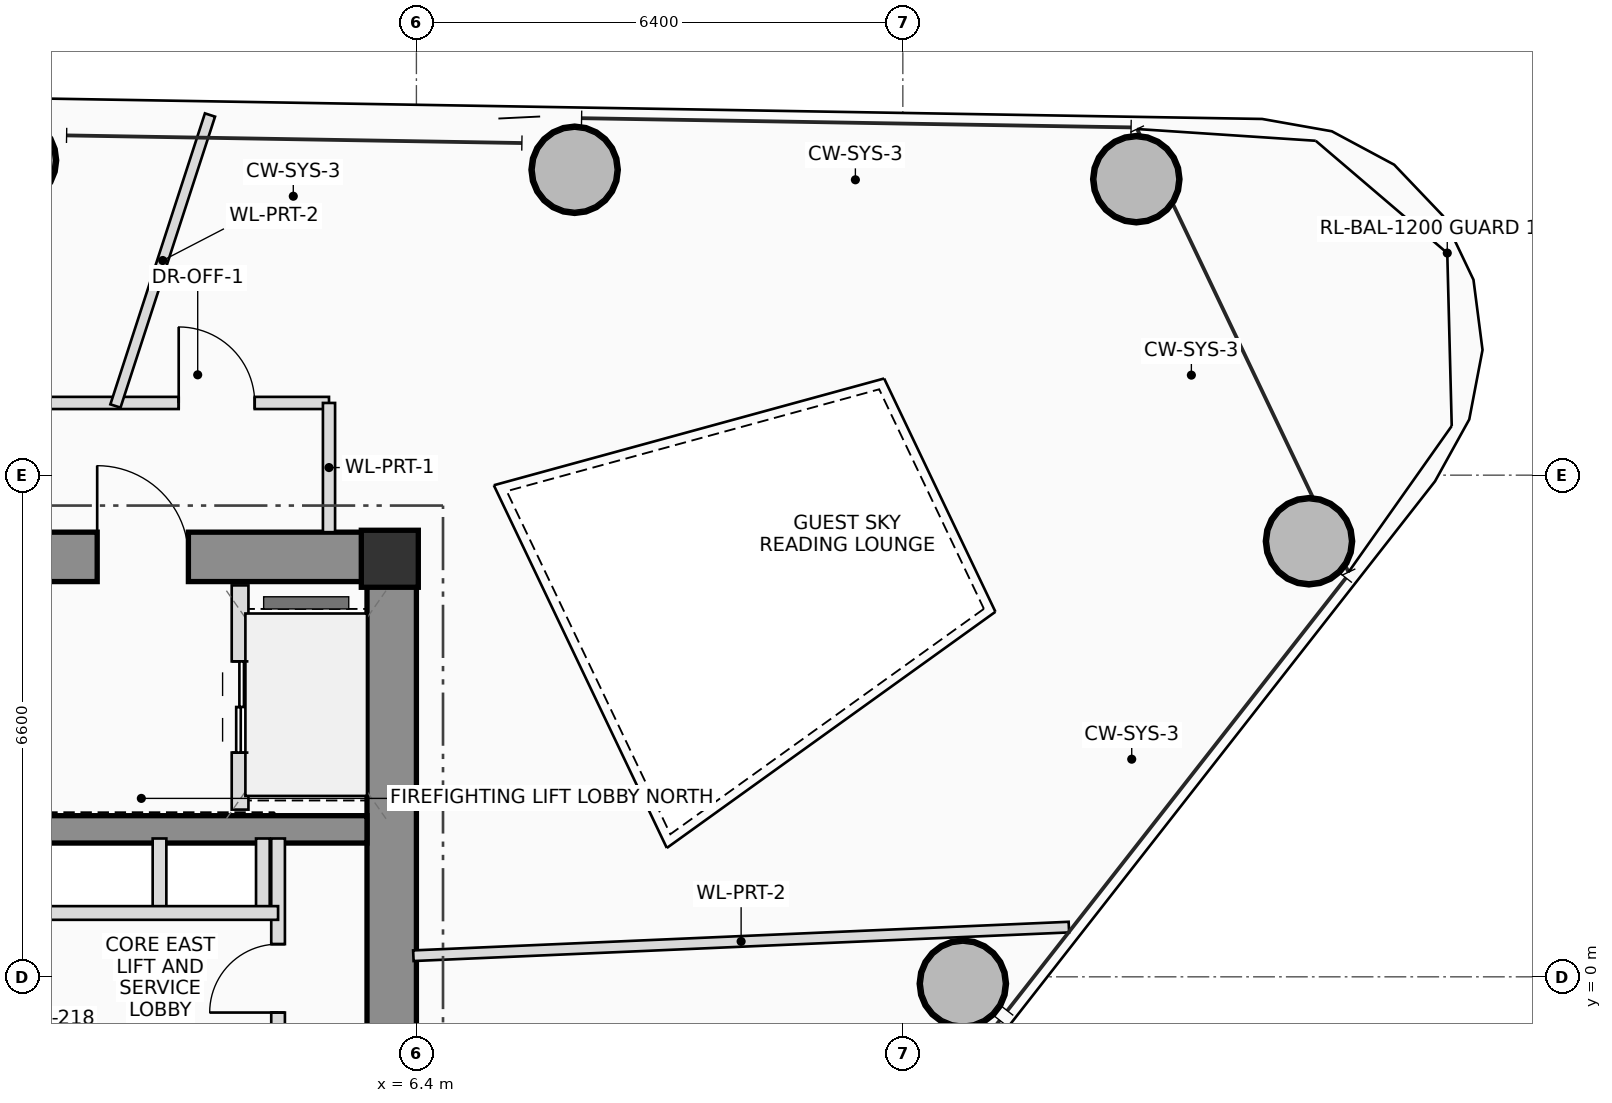
"""IFC4 building model, lengths in metres.
Left out: names, types, materials, properties, quantities, classifications, styles, units other than length and angle.
Written with IfcOpenShell. Run it as: python <this file> out.ifc"""

import sys

from ifc_helpers import new_model, si_unit, direction, frame, frame_2d, origin, origin_2d, place, context, subcontext, project, spatial, rectangle, hollow_circle, extrude, source, transform, mapped, element, fill, save


model = new_model("IFC4")
c1 = context("Model", 3, precision=1e-05, world=origin(), true_north=direction((0.0, 1.0)))
c2 = subcontext(c1, "Body", "Model", "MODEL_VIEW")
j1 = project(units=[si_unit("LENGTHUNIT", "METRE"), si_unit("PLANEANGLEUNIT", "RADIAN")], contexts=[c1])
p1 = place(None, origin())
s1 = spatial("IfcSite", under=j1, at=p1, CompositionType="ELEMENT")
p2 = place(p1, origin())
s2 = spatial("IfcBuilding", under=s1, at=p2, CompositionType="ELEMENT")
p3 = place(p2, frame((0.0, 0.0, 205.25)))
s3 = spatial("IfcBuildingStorey", under=s2, at=p3, CompositionType="ELEMENT", Elevation=205.25)
m1 = source(origin(), c2, "Body", "SweptSolid", [
    extrude(rectangle(XDim=0.75, YDim=0.75, at=origin_2d()), origin(), (0.0, 0.0, 1.0), 3.45),
])
p4 = place(p3, frame((6.05, 5.5, 0.0), z_axis=(0.0, 0.0, 1.0), x_axis=(1.0, 0.0, 0.0)))
e1 = element("IfcColumn", 1, at=p4, inside=s3, PredefinedType="COLUMN", context=c2, shape_type="MappedRepresentation", body=[
    mapped(m1, transform((0.0, 0.0, 0.0), scale=1.0)),
])
p5 = place(p3, frame((-6.4, 5.525, 0.0), z_axis=(0.0, 0.0, 1.0), x_axis=(1.0, 0.0, 0.0)))
e2 = element("IfcWall", 2, at=p5, inside=s3, PredefinedType="SHEAR", context=c2, shape_type="SweptSolid", body=[
    extrude(rectangle(XDim=12.8, YDim=0.65, at=frame_2d((6.4, 0.0))), origin(), (0.0, 0.0, 1.0), 3.45),
])
p6 = place(p5, frame((8.6, 0.0, 0.0)))
e3 = element("IfcOpeningElement", 3, at=p6, cuts=e2, PredefinedType="OPENING", context=c2, shape_type="SweptSolid", body=[
    extrude(rectangle(XDim=1.2, YDim=2.2, at=frame_2d((0.6, 1.1))), frame((0.0, 0.335, 0.0), z_axis=(0.0, -1.0, 0.0), x_axis=(1.0, 0.0, 0.0)), (0.0, 0.0, 1.0), 0.67),
])
p7 = place(p3, frame((6.075, -5.2, 0.0), z_axis=(0.0, 0.0, 1.0), x_axis=(0.0, 1.0, 0.0)))
e4 = element("IfcWall", 4, at=p7, inside=s3, PredefinedType="SHEAR", context=c2, shape_type="SweptSolid", body=[
    extrude(rectangle(XDim=10.4, YDim=0.65, at=frame_2d((5.2, 0.0))), origin(), (0.0, 0.0, 1.0), 3.45),
])
p8 = place(p3, frame((-5.75, 1.94, 0.0), z_axis=(0.0, 0.0, 1.0), x_axis=(1.0, 0.0, 0.0)))
e5 = element("IfcWall", 5, at=p8, inside=s3, PredefinedType="SHEAR", context=c2, shape_type="SweptSolid", body=[
    extrude(rectangle(XDim=11.5, YDim=0.36, at=frame_2d((5.75, 0.0))), origin(), (0.0, 0.0, 1.0), 3.45),
])
m2 = source(origin(), c2, "Body", "SweptSolid", [
    extrude(hollow_circle(Radius=0.575, WallThickness=0.042, at=origin_2d()), origin(), (0.0, 0.0, 1.0), 3.45),
])
for number, where, z_axis, x_axis in (
    (6, (13.59, -0.09, 0.0), (0.0, 0.0, 1.0), (1.0, 0.0, 0.0)),
    (7, (18.144, 5.731, 0.0), (0.0, 0.0, 1.0), (1.0, 0.0, 0.0)),
    (8, (15.872, 10.494, 0.0), (0.0, 0.0, 1.0), (1.0, 0.0, 0.0)),
    (9, (8.482, 10.618, 0.0), (0.0, 0.0, 1.0), (1.0, 0.0, 0.0)),
    (10, (1.092, 10.742, 0.0), (0.0, 0.0, 1.0), (1.0, 0.0, 0.0)),
):
    element("IfcColumn", number, at=place(p3, frame(where, z_axis=z_axis, x_axis=x_axis)), inside=s3, PredefinedType="COLUMN", context=c2, shape_type="MappedRepresentation", body=[
        mapped(m2, transform((0.0, 0.0, 0.0), scale=1.0)),
    ])
p9 = place(p3, frame((4.08, 2.2, 0.0), z_axis=(0.0, 0.0, 1.0), x_axis=(0.0, 1.0, 0.0)))
e11 = element("IfcWall", 11, at=p9, inside=s3, PredefinedType="PLUMBINGWALL", context=c2, shape_type="SweptSolid", body=[
    extrude(rectangle(XDim=2.95, YDim=0.22, at=frame_2d((1.475, 0.0))), origin(), (0.0, 0.0, 1.0), 3.25),
])
p10 = place(p9, frame((0.75, 0.0, 0.0)))
e12 = element("IfcOpeningElement", 12, at=p10, cuts=e11, PredefinedType="OPENING", context=c2, shape_type="SweptSolid", body=[
    extrude(rectangle(XDim=1.2, YDim=2.25, at=frame_2d((0.6, 1.125))), frame((0.0, 0.12, 0.0), z_axis=(0.0, -1.0, 0.0), x_axis=(1.0, 0.0, 0.0)), (0.0, 0.0, 1.0), 0.24),
])
for number, where, z_axis, x_axis in (
    (13, (3.02, 0.84, 0.0), (0.0, 0.0, 1.0), (0.0, 1.0, 0.0)),
    (14, (4.38, 0.84, 0.0), (0.0, 0.0, 1.0), (0.0, 1.0, 0.0)),
):
    element("IfcWall", number, at=place(p3, frame(where, z_axis=z_axis, x_axis=x_axis)), inside=s3, PredefinedType="PLUMBINGWALL", context=c2, shape_type="SweptSolid", body=[
        extrude(rectangle(XDim=0.98, YDim=0.18, at=frame_2d((0.49, 0.0))), origin(), (0.0, 0.0, 1.0), 3.25),
    ])
p11 = place(p3, frame((4.58, -1.82, 0.0), z_axis=(0.0, 0.0, 1.0), x_axis=(0.0, 1.0, 0.0)))
e15 = element("IfcWall", 15, at=p11, inside=s3, PredefinedType="PLUMBINGWALL", context=c2, shape_type="SweptSolid", body=[
    extrude(rectangle(XDim=3.64, YDim=0.18, at=frame_2d((1.82, 0.0))), origin(), (0.0, 0.0, 1.0), 3.25),
])
p12 = place(p11, frame((1.35, 0.0, 0.0)))
e16 = element("IfcOpeningElement", 16, at=p12, cuts=e15, PredefinedType="OPENING", context=c2, shape_type="SweptSolid", body=[
    extrude(rectangle(XDim=0.9, YDim=2.05, at=frame_2d((0.45, 1.025))), frame((0.0, 0.1, 0.0), z_axis=(0.0, -1.0, 0.0), x_axis=(1.0, 0.0, 0.0)), (0.0, 0.0, 1.0), 0.2),
])
p13 = place(p3, frame((-5.68, 0.84, 0.0), z_axis=(0.0, 0.0, 1.0), x_axis=(1.0, 0.0, 0.0)))
e17 = element("IfcWall", 17, at=p13, inside=s3, PredefinedType="PLUMBINGWALL", context=c2, shape_type="SweptSolid", body=[
    extrude(rectangle(XDim=10.26, YDim=0.18, at=frame_2d((5.13, 0.0))), origin(), (0.0, 0.0, 1.0), 3.25),
])
p14 = place(p13, frame((1.08, 0.0, 0.0)))
e18 = element("IfcOpeningElement", 18, at=p14, cuts=e17, PredefinedType="OPENING", context=c2, shape_type="SweptSolid", body=[
    extrude(rectangle(XDim=0.9, YDim=2.05, at=frame_2d((0.45, 1.025))), frame((0.0, 0.1, 0.0), z_axis=(0.0, -1.0, 0.0), x_axis=(1.0, 0.0, 0.0)), (0.0, 0.0, 1.0), 0.2),
])
p15 = place(p13, frame((3.93, 0.0, 0.0)))
e19 = element("IfcOpeningElement", 19, at=p15, cuts=e17, PredefinedType="OPENING", context=c2, shape_type="SweptSolid", body=[
    extrude(rectangle(XDim=1.1, YDim=2.2, at=frame_2d((0.55, 1.1))), frame((0.0, 0.1, 0.0), z_axis=(0.0, -1.0, 0.0), x_axis=(1.0, 0.0, 0.0)), (0.0, 0.0, 1.0), 0.2),
])
p16 = place(p13, frame((5.63, 0.0, 0.0)))
e20 = element("IfcOpeningElement", 20, at=p16, cuts=e17, PredefinedType="OPENING", context=c2, shape_type="SweptSolid", body=[
    extrude(rectangle(XDim=1.1, YDim=2.2, at=frame_2d((0.55, 1.1))), frame((0.0, 0.1, 0.0), z_axis=(0.0, -1.0, 0.0), x_axis=(1.0, 0.0, 0.0)), (0.0, 0.0, 1.0), 0.2),
])
p17 = place(p3, frame((-6.36, 7.55, 0.0), z_axis=(0.0, 0.0, 1.0), x_axis=(1.0, 0.0, 0.0)))
e21 = element("IfcWall", 21, at=p17, inside=s3, PredefinedType="PARTITIONING", context=c2, shape_type="SweptSolid", body=[
    extrude(rectangle(XDim=11.61, YDim=0.16, at=frame_2d((5.805, 0.0))), origin(), (0.0, 0.0, 1.0), 2.605),
])
p18 = place(p17, frame((5.985, 0.0, 0.0)))
e22 = element("IfcOpeningElement", 22, at=p18, cuts=e21, PredefinedType="OPENING", context=c2, shape_type="SweptSolid", body=[
    extrude(rectangle(XDim=1.0, YDim=2.25, at=frame_2d((0.5, 1.125))), frame((0.0, 0.09, 0.0), z_axis=(0.0, -1.0, 0.0), x_axis=(1.0, 0.0, 0.0)), (0.0, 0.0, 1.0), 0.18),
])
p19 = place(p17, frame((9.633, 0.0, 0.0)))
e23 = element("IfcOpeningElement", 23, at=p19, cuts=e21, PredefinedType="OPENING", context=c2, shape_type="SweptSolid", body=[
    extrude(rectangle(XDim=1.0, YDim=2.25, at=frame_2d((0.5, 1.125))), frame((0.0, 0.09, 0.0), z_axis=(0.0, -1.0, 0.0), x_axis=(1.0, 0.0, 0.0)), (0.0, 0.0, 1.0), 0.18),
])
p20 = place(p3, frame((5.25, 7.55, 0.0), z_axis=(0.0, 0.0, 1.0), x_axis=(0.0, -1.0, 0.0)))
e24 = element("IfcWall", 24, at=p20, inside=s3, PredefinedType="PARTITIONING", context=c2, shape_type="SweptSolid", body=[
    extrude(rectangle(XDim=1.7, YDim=0.16, at=frame_2d((0.85, 0.0))), origin(), (0.0, 0.0, 1.0), 2.605),
])
p21 = place(p3, frame((6.36, 0.278, 0.0), z_axis=(0.0, 0.0, 1.0), x_axis=(0.999047440648, 0.043637270025, 0.0)))
e25 = element("IfcWall", 25, at=p21, inside=s3, PredefinedType="PARTITIONING", context=c2, shape_type="SweptSolid", body=[
    extrude(rectangle(XDim=8.633, YDim=0.14, at=frame_2d((4.316, 0.0))), origin(), (0.0, 0.0, 1.0), 2.605),
])
p22 = place(p3, frame((2.44, 7.51, 0.0), z_axis=(0.0, 0.0, 1.0), x_axis=(0.309013387048, 0.951057688379, 0.0)))
e26 = element("IfcWall", 26, at=p22, inside=s3, PredefinedType="PARTITIONING", context=c2, shape_type="SweptSolid", body=[
    extrude(rectangle(XDim=4.025, YDim=0.14, at=frame_2d((2.013, 0.0))), origin(), (0.0, 0.0, 1.0), 2.605),
])
p23 = place(p6, origin())
e27 = element("IfcDoor", 27, at=p23, inside=s3, OperationType="SINGLE_SWING_LEFT", PredefinedType="DOOR", context=c2, shape_type="SweptSolid", body=[
    extrude(rectangle(XDim=1.2, YDim=2.2, at=frame_2d((0.6, 1.1))), frame((0.0, 0.025, 0.0), z_axis=(0.0, -1.0, 0.0), x_axis=(1.0, 0.0, 0.0)), (0.0, 0.0, 1.0), 0.05),
])
fill(e3, e27)
p24 = place(p10, origin())
e28 = element("IfcDoor", 28, at=p24, inside=s3, OperationType="DOUBLE_DOOR_SLIDING", PredefinedType="DOOR", context=c2, shape_type="SweptSolid", body=[
    extrude(rectangle(XDim=1.2, YDim=2.25, at=frame_2d((0.6, 1.125))), frame((0.0, 0.025, 0.0), z_axis=(0.0, -1.0, 0.0), x_axis=(1.0, 0.0, 0.0)), (0.0, 0.0, 1.0), 0.05),
])
fill(e12, e28)
p25 = place(p12, origin())
e29 = element("IfcDoor", 29, at=p25, inside=s3, OperationType="SINGLE_SWING_LEFT", PredefinedType="DOOR", context=c2, shape_type="SweptSolid", body=[
    extrude(rectangle(XDim=0.9, YDim=2.05, at=frame_2d((0.45, 1.025))), frame((0.0, 0.025, 0.0), z_axis=(0.0, -1.0, 0.0), x_axis=(1.0, 0.0, 0.0)), (0.0, 0.0, 1.0), 0.05),
])
fill(e16, e29)
p26 = place(p19, origin())
e30 = element("IfcDoor", 30, at=p26, inside=s3, OperationType="SINGLE_SWING_LEFT", PredefinedType="DOOR", context=c2, shape_type="SweptSolid", body=[
    extrude(rectangle(XDim=1.0, YDim=2.25, at=frame_2d((0.5, 1.125))), frame((0.0, 0.025, 0.0), z_axis=(0.0, -1.0, 0.0), x_axis=(1.0, 0.0, 0.0)), (0.0, 0.0, 1.0), 0.05),
])
fill(e23, e30)
save(model, sys.argv[1])
